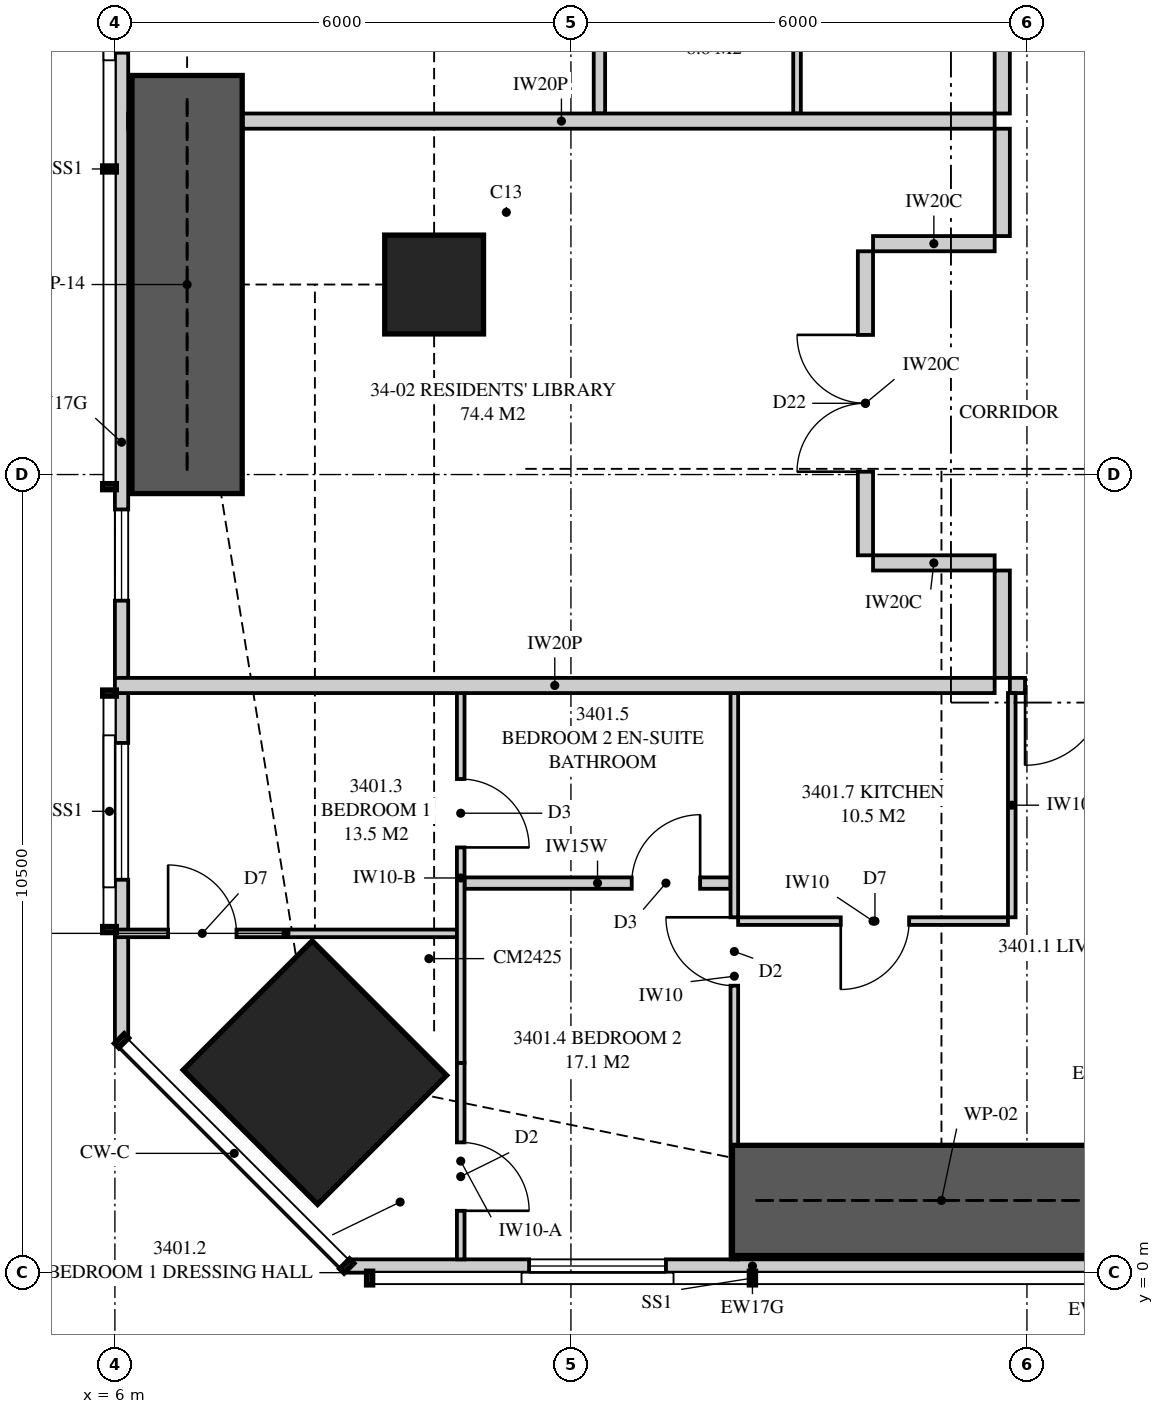
"""IFC4 building model, lengths in metres.
Left out: names, types, materials, properties, quantities, classifications, styles, units other than length and angle.
Written with IfcOpenShell. Run it as: python <this file> out.ifc"""

import sys

from ifc_helpers import new_model, si_unit, direction, frame, frame_2d, origin, origin_2d, place, context, subcontext, project, spatial, polyline, rectangle, outline, extrude, element, fill, save


model = new_model("IFC4")
c1 = context("Model", 3, precision=1e-05, world=origin(), true_north=direction((0.0, 1.0)))
c2 = subcontext(c1, "Body", "Model", "MODEL_VIEW")
j1 = project(units=[si_unit("LENGTHUNIT", "METRE"), si_unit("PLANEANGLEUNIT", "RADIAN")], contexts=[c1])
p1 = place(None, origin())
s1 = spatial("IfcSite", under=j1, at=p1, CompositionType="ELEMENT")
p2 = place(p1, origin())
s2 = spatial("IfcBuilding", under=s1, at=p2, CompositionType="ELEMENT")
p3 = place(p2, frame((0.0, 0.0, 124.95)))
s3 = spatial("IfcBuildingStorey", under=s2, at=p3, CompositionType="ELEMENT", Elevation=124.95)
p4 = place(p3, frame((8.631, 2.631, 0.0), z_axis=(0.0, 0.0, 1.0), x_axis=(0.707106781187, 0.707106781187, 0.0)))
e1 = element("IfcColumn", 1, at=p4, inside=s3, PredefinedType="COLUMN", context=c2, shape_type="SweptSolid", body=[
    extrude(rectangle(XDim=2.4, YDim=2.5, at=origin_2d()), origin(), (0.0, 0.0, 1.0), 3.35),
])
p5 = place(p3, frame((10.2, 13.0, 0.0), z_axis=(0.0, 0.0, 1.0), x_axis=(1.0, 0.0, 0.0)))
e2 = element("IfcColumn", 2, at=p5, inside=s3, PredefinedType="COLUMN", context=c2, shape_type="SweptSolid", body=[
    extrude(rectangle(XDim=1.3, YDim=1.3, at=origin_2d()), origin(), (0.0, 0.0, 1.0), 3.35),
])
p6 = place(p3, frame((9.051, 0.087, 0.0), z_axis=(0.0, 0.0, 1.0), x_axis=(1.0, 0.0, 0.0)))
e3 = element("IfcWall", 3, at=p6, inside=s3, PredefinedType="SOLIDWALL", context=c2, shape_type="SweptSolid", body=[
    extrude(outline(polyline([(0.0, 0.0), (10.674, 0.0), (10.674, 2.15), (7.824, 2.15), (7.824, 3.11), (7.666, 3.11), (7.666, 2.15), (7.62, 2.15), (7.62, 3.11), (0.0, 3.11), (0.0, 0.0)])), frame((0.0, 0.087, 0.0), z_axis=(0.0, -1.0, 0.0), x_axis=(1.0, 0.0, 0.0)), (0.0, 0.0, 1.0), 0.175),
])
p7 = place(p6, frame((2.399, 0.0, 0.4)))
e4 = element("IfcOpeningElement", 4, at=p7, cuts=e3, PredefinedType="OPENING", context=c2, shape_type="SweptSolid", body=[
    extrude(rectangle(XDim=1.8, YDim=1.7, at=frame_2d((0.9, 0.85))), frame((0.0, 0.097, 0.0), z_axis=(0.0, -1.0, 0.0), x_axis=(1.0, 0.0, 0.0)), (0.0, 0.0, 1.0), 0.195),
])
p8 = place(p3, frame((6.087, 18.8, 0.0), z_axis=(0.0, 0.0, 1.0), x_axis=(0.0, -1.0, 0.0)))
e5 = element("IfcWall", 5, at=p8, inside=s3, PredefinedType="SOLIDWALL", context=c2, shape_type="SweptSolid", body=[
    extrude(outline(polyline([(0.0, 0.0), (15.749, 0.0), (15.749, 3.11), (6.019, 3.11), (6.019, 2.15), (5.926, 2.15), (5.926, 3.11), (5.8, 3.11), (5.8, 2.15), (0.0, 2.15), (0.0, 0.0)])), frame((0.0, 0.087, 0.0), z_axis=(0.0, -1.0, 0.0), x_axis=(1.0, 0.0, 0.0)), (0.0, 0.0, 1.0), 0.175),
])
p9 = place(p8, frame((0.95, 0.0, 0.4)))
e6 = element("IfcOpeningElement", 6, at=p9, cuts=e5, PredefinedType="OPENING", context=c2, shape_type="SweptSolid", body=[
    extrude(rectangle(XDim=1.8, YDim=1.7, at=frame_2d((0.9, 0.85))), frame((0.0, 0.097, 0.0), z_axis=(0.0, -1.0, 0.0), x_axis=(1.0, 0.0, 0.0)), (0.0, 0.0, 1.0), 0.195),
])
p10 = place(p8, frame((8.76, 0.0, 0.4)))
e7 = element("IfcOpeningElement", 7, at=p10, cuts=e5, PredefinedType="OPENING", context=c2, shape_type="SweptSolid", body=[
    extrude(rectangle(XDim=1.2, YDim=1.7, at=frame_2d((0.6, 0.85))), frame((0.0, 0.097, 0.0), z_axis=(0.0, -1.0, 0.0), x_axis=(1.0, 0.0, 0.0)), (0.0, 0.0, 1.0), 0.195),
])
p11 = place(p8, frame((11.831, 0.0, 0.4)))
e8 = element("IfcOpeningElement", 8, at=p11, cuts=e5, PredefinedType="OPENING", context=c2, shape_type="SweptSolid", body=[
    extrude(rectangle(XDim=1.8, YDim=1.7, at=frame_2d((0.9, 0.85))), frame((0.0, 0.097, 0.0), z_axis=(0.0, -1.0, 0.0), x_axis=(1.0, 0.0, 0.0)), (0.0, 0.0, 1.0), 0.195),
])
p12 = place(p3, frame((17.775, 7.725, 0.0), z_axis=(0.0, 0.0, 1.0), x_axis=(1.0, 0.0, 0.0)))
e9 = element("IfcWall", 9, at=p12, inside=s3, PredefinedType="PARTITIONING", context=c2, shape_type="SweptSolid", body=[
    extrude(rectangle(XDim=9.025, YDim=0.2, at=frame_2d((4.513, 0.0))), origin(), (0.0, 0.0, 1.0), 3.11),
])
p13 = place(p12, frame((0.2, 0.0, 0.0)))
e10 = element("IfcOpeningElement", 10, at=p13, cuts=e9, PredefinedType="OPENING", context=c2, shape_type="SweptSolid", body=[
    extrude(rectangle(XDim=1.05, YDim=2.2, at=frame_2d((0.525, 1.1))), frame((0.0, 0.11, 0.0), z_axis=(0.0, -1.0, 0.0), x_axis=(1.0, 0.0, 0.0)), (0.0, 0.0, 1.0), 0.22),
])
p14 = place(p3, frame((10.55, 0.175, 0.0), z_axis=(0.0, 0.0, 1.0), x_axis=(0.0, 1.0, 0.0)))
e11 = element("IfcWall", 11, at=p14, inside=s3, PredefinedType="PARTITIONING", context=c2, shape_type="SweptSolid", body=[
    extrude(outline(polyline([(0.0, 0.0), (2.585, 0.0), (2.585, 2.15), (1.188, 2.15), (1.188, 3.11), (0.0, 3.11), (0.0, 0.0)])), frame((0.0, 0.05, 0.0), z_axis=(0.0, -1.0, 0.0), x_axis=(1.0, 0.0, 0.0)), (0.0, 0.0, 1.0), 0.1),
])
p15 = place(p14, frame((0.639, 0.0, 0.0)))
e12 = element("IfcOpeningElement", 12, at=p15, cuts=e11, PredefinedType="OPENING", context=c2, shape_type="SweptSolid", body=[
    extrude(rectangle(XDim=0.9, YDim=2.1, at=frame_2d((0.45, 1.05))), frame((0.0, 0.06, 0.0), z_axis=(0.0, -1.0, 0.0), x_axis=(1.0, 0.0, 0.0)), (0.0, 0.0, 1.0), 0.12),
])
p16 = place(p3, frame((10.55, 2.76, 0.0), z_axis=(0.0, 0.0, 1.0), x_axis=(0.0, 1.0, 0.0)))
e13 = element("IfcWall", 13, at=p16, inside=s3, PredefinedType="PARTITIONING", context=c2, shape_type="SweptSolid", body=[
    extrude(outline(polyline([(0.0, 0.0), (4.865, 0.0), (4.865, 2.51), (0.358, 2.51), (0.358, 2.15), (0.0, 2.15), (0.0, 0.0)])), frame((0.0, 0.05, 0.0), z_axis=(0.0, -1.0, 0.0), x_axis=(1.0, 0.0, 0.0)), (0.0, 0.0, 1.0), 0.1),
])
p17 = place(p16, frame((2.834, 0.0, 0.0)))
e14 = element("IfcOpeningElement", 14, at=p17, cuts=e13, PredefinedType="OPENING", context=c2, shape_type="SweptSolid", body=[
    extrude(rectangle(XDim=0.9, YDim=2.1, at=frame_2d((0.45, 1.05))), frame((0.0, 0.06, 0.0), z_axis=(0.0, -1.0, 0.0), x_axis=(1.0, 0.0, 0.0)), (0.0, 0.0, 1.0), 0.12),
])
p18 = place(p3, frame((14.15, 0.175, 0.0), z_axis=(0.0, 0.0, 1.0), x_axis=(0.0, 1.0, 0.0)))
e15 = element("IfcWall", 15, at=p18, inside=s3, PredefinedType="PARTITIONING", context=c2, shape_type="SweptSolid", body=[
    extrude(outline(polyline([(0.0, 0.0), (7.45, 0.0), (7.45, 3.11), (2.208, 3.11), (2.208, 2.15), (0.453, 2.15), (0.453, 3.11), (0.0, 3.11), (0.0, 0.0)])), frame((0.0, 0.05, 0.0), z_axis=(0.0, -1.0, 0.0), x_axis=(1.0, 0.0, 0.0)), (0.0, 0.0, 1.0), 0.1),
])
p19 = place(p18, frame((3.6, 0.0, 0.0)))
e16 = element("IfcOpeningElement", 16, at=p19, cuts=e15, PredefinedType="OPENING", context=c2, shape_type="SweptSolid", body=[
    extrude(rectangle(XDim=0.9, YDim=2.1, at=frame_2d((0.45, 1.05))), frame((0.0, 0.06, 0.0), z_axis=(0.0, -1.0, 0.0), x_axis=(1.0, 0.0, 0.0)), (0.0, 0.0, 1.0), 0.12),
])
p20 = place(p3, frame((6.0, 4.464, 0.0), z_axis=(0.0, 0.0, 1.0), x_axis=(1.0, 0.0, 0.0)))
e17 = element("IfcWall", 17, at=p20, inside=s3, PredefinedType="PARTITIONING", context=c2, shape_type="SweptSolid", body=[
    extrude(outline(polyline([(0.0, 0.0), (4.5, 0.0), (4.5, 3.11), (4.5, 2.51), (3.206, 2.51), (3.206, 2.15), (1.463, 2.15), (1.463, 3.11), (0.0, 3.11), (0.0, 0.0)])), frame((0.0, 0.05, 0.0), z_axis=(0.0, -1.0, 0.0), x_axis=(1.0, 0.0, 0.0)), (0.0, 0.0, 1.0), 0.1),
])
p21 = place(p20, frame((0.7, 0.0, 0.0)))
e18 = element("IfcOpeningElement", 18, at=p21, cuts=e17, PredefinedType="OPENING", context=c2, shape_type="SweptSolid", body=[
    extrude(rectangle(XDim=0.9, YDim=2.1, at=frame_2d((0.45, 1.05))), frame((0.0, 0.06, 0.0), z_axis=(0.0, -1.0, 0.0), x_axis=(1.0, 0.0, 0.0)), (0.0, 0.0, 1.0), 0.12),
])
p22 = place(p3, frame((10.6, 5.125, 0.0), z_axis=(0.0, 0.0, 1.0), x_axis=(1.0, 0.0, 0.0)))
e19 = element("IfcWall", 19, at=p22, inside=s3, PredefinedType="PLUMBINGWALL", context=c2, shape_type="SweptSolid", body=[
    extrude(outline(polyline([(0.0, 0.0), (3.5, 0.0), (3.5, 3.11), (0.885, 3.11), (0.885, 2.51), (0.0, 2.51), (0.0, 3.11), (0.0, 0.0)])), frame((0.0, 0.075, 0.0), z_axis=(0.0, -1.0, 0.0), x_axis=(1.0, 0.0, 0.0)), (0.0, 0.0, 1.0), 0.15),
])
p23 = place(p22, frame((2.2, 0.0, 0.0)))
e20 = element("IfcOpeningElement", 20, at=p23, cuts=e19, PredefinedType="OPENING", context=c2, shape_type="SweptSolid", body=[
    extrude(rectangle(XDim=0.9, YDim=2.1, at=frame_2d((0.45, 1.05))), frame((0.0, 0.085, 0.0), z_axis=(0.0, -1.0, 0.0), x_axis=(1.0, 0.0, 0.0)), (0.0, 0.0, 1.0), 0.17),
])
p24 = place(p3, frame((14.2, 4.625, 0.0), z_axis=(0.0, 0.0, 1.0), x_axis=(1.0, 0.0, 0.0)))
e21 = element("IfcWall", 21, at=p24, inside=s3, PredefinedType="PARTITIONING", context=c2, shape_type="SweptSolid", body=[
    extrude(outline(polyline([(0.0, 0.0), (3.55, 0.0), (3.55, 3.11), (2.962, 3.11), (2.962, 2.541), (2.388, 2.541), (2.388, 3.11), (0.0, 3.11), (0.0, 0.0)])), frame((0.0, 0.05, 0.0), z_axis=(0.0, -1.0, 0.0), x_axis=(1.0, 0.0, 0.0)), (0.0, 0.0, 1.0), 0.1),
])
p25 = place(p24, frame((1.35, 0.0, 0.0)))
e22 = element("IfcOpeningElement", 22, at=p25, cuts=e21, PredefinedType="OPENING", context=c2, shape_type="SweptSolid", body=[
    extrude(rectangle(XDim=0.9, YDim=2.1, at=frame_2d((0.45, 1.05))), frame((0.0, 0.06, 0.0), z_axis=(0.0, -1.0, 0.0), x_axis=(1.0, 0.0, 0.0)), (0.0, 0.0, 1.0), 0.12),
])
p26 = place(p3, frame((17.8, 4.675, 0.0), z_axis=(0.0, 0.0, 1.0), x_axis=(0.0, 1.0, 0.0)))
e23 = element("IfcWall", 23, at=p26, inside=s3, PredefinedType="PARTITIONING", context=c2, shape_type="SweptSolid", body=[
    extrude(rectangle(XDim=2.95, YDim=0.1, at=frame_2d((1.475, 0.0))), origin(), (0.0, 0.0, 1.0), 3.11),
])
p27 = place(p3, frame((6.0, 7.725, 0.0), z_axis=(0.0, 0.0, 1.0), x_axis=(1.0, 0.0, 0.0)))
e24 = element("IfcWall", 24, at=p27, inside=s3, PredefinedType="PARTITIONING", context=c2, shape_type="SweptSolid", body=[
    extrude(outline(polyline([(0.0, 0.0), (11.575, 0.0), (11.575, 3.11), (11.212, 3.11), (11.212, 2.541), (10.538, 2.541), (10.538, 3.11), (5.51, 3.11), (5.51, 2.51), (2.969, 2.51), (2.969, 2.541), (2.727, 2.541), (2.727, 2.15), (0.884, 2.15), (0.884, 3.11), (0.0, 3.11), (0.0, 0.0)])), frame((0.0, 0.1, 0.0), z_axis=(0.0, -1.0, 0.0), x_axis=(1.0, 0.0, 0.0)), (0.0, 0.0, 1.0), 0.2),
])
p28 = place(p3, frame((6.175, 15.15, 0.0), z_axis=(0.0, 0.0, 1.0), x_axis=(1.0, 0.0, 0.0)))
e25 = element("IfcWall", 25, at=p28, inside=s3, PredefinedType="PARTITIONING", context=c2, shape_type="SweptSolid", body=[
    extrude(outline(polyline([(0.529, 2.15), (0.0, 2.15), (0.0, 0.0), (0.529, 0.0), (0.529, 0.034), (1.021, 0.034), (1.021, 0.0), (11.4, 0.0), (11.4, 3.11), (5.335, 3.11), (5.335, 2.51), (2.715, 2.51), (2.715, 3.11), (1.685, 3.11), (1.685, 2.15), (1.021, 2.15), (1.021, 2.116), (0.529, 2.116), (0.529, 2.15)])), frame((0.0, 0.1, 0.0), z_axis=(0.0, -1.0, 0.0), x_axis=(1.0, 0.0, 0.0)), (0.0, 0.0, 1.0), 0.2),
])
p29 = place(p3, frame((17.675, 7.825, 0.0), z_axis=(0.0, 0.0, 1.0), x_axis=(0.0, 1.0, 0.0)))
e26 = element("IfcWall", 26, at=p29, inside=s3, PredefinedType="PARTITIONING", context=c2, shape_type="SweptSolid", body=[
    extrude(rectangle(XDim=1.413, YDim=0.2, at=frame_2d((0.706, 0.0))), origin(), (0.0, 0.0, 1.0), 3.11),
])
p30 = place(p3, frame((17.675, 15.25, 0.0), z_axis=(0.0, 0.0, 1.0), x_axis=(0.0, 1.0, 0.0)))
e27 = element("IfcWall", 27, at=p30, inside=s3, PredefinedType="PARTITIONING", context=c2, shape_type="SweptSolid", body=[
    extrude(rectangle(XDim=5.562, YDim=0.2, at=frame_2d((2.781, 0.0))), origin(), (0.0, 0.0, 1.0), 3.11),
])
p31 = place(p3, frame((12.375, 15.25, 0.0), z_axis=(0.0, 0.0, 1.0), x_axis=(0.0, 1.0, 0.0)))
e28 = element("IfcWall", 28, at=p31, inside=s3, PredefinedType="PLUMBINGWALL", context=c2, shape_type="SweptSolid", body=[
    extrude(rectangle(XDim=3.45, YDim=0.15, at=frame_2d((1.725, 0.0))), origin(), (0.0, 0.0, 1.0), 3.11),
])
p32 = place(p31, frame((2.15, 0.0, 0.0)))
e29 = element("IfcOpeningElement", 29, at=p32, cuts=e28, PredefinedType="OPENING", context=c2, shape_type="SweptSolid", body=[
    extrude(rectangle(XDim=0.9, YDim=2.1, at=frame_2d((0.45, 1.05))), frame((0.0, 0.085, 0.0), z_axis=(0.0, -1.0, 0.0), x_axis=(1.0, 0.0, 0.0)), (0.0, 0.0, 1.0), 0.17),
])
p33 = place(p3, frame((14.975, 15.25, 0.0), z_axis=(0.0, 0.0, 1.0), x_axis=(0.0, 1.0, 0.0)))
e30 = element("IfcWall", 30, at=p33, inside=s3, PredefinedType="PARTITIONING", context=c2, shape_type="SweptSolid", body=[
    extrude(rectangle(XDim=3.45, YDim=0.1, at=frame_2d((1.725, 0.0))), origin(), (0.0, 0.0, 1.0), 3.11),
])
p34 = place(p3, frame((17.675, 13.637, 0.0), z_axis=(0.0, 0.0, 1.0), x_axis=(0.0, 1.0, 0.0)))
e31 = element("IfcWall", 31, at=p34, inside=s3, PredefinedType="PARTITIONING", context=c2, shape_type="SweptSolid", body=[
    extrude(rectangle(XDim=1.413, YDim=0.2, at=frame_2d((0.706, 0.0))), origin(), (0.0, 0.0, 1.0), 3.11),
])
p35 = place(p3, frame((15.875, 9.438, 0.0), z_axis=(0.0, 0.0, 1.0), x_axis=(0.0, 1.0, 0.0)))
e32 = element("IfcWall", 32, at=p35, inside=s3, PredefinedType="PARTITIONING", context=c2, shape_type="SweptSolid", body=[
    extrude(outline(polyline([(0.0, 0.0), (4.0, 0.0), (4.0, 3.11), (1.475, 3.11), (1.475, 2.541), (0.8, 2.541), (0.8, 3.11), (0.0, 3.11), (0.0, 0.0)])), frame((0.0, 0.1, 0.0), z_axis=(0.0, -1.0, 0.0), x_axis=(1.0, 0.0, 0.0)), (0.0, 0.0, 1.0), 0.2),
])
p36 = place(p35, frame((1.1, 0.0, 0.0)))
e33 = element("IfcOpeningElement", 33, at=p36, cuts=e32, PredefinedType="OPENING", context=c2, shape_type="SweptSolid", body=[
    extrude(rectangle(XDim=1.8, YDim=2.1, at=frame_2d((0.9, 1.05))), frame((0.0, 0.11, 0.0), z_axis=(0.0, -1.0, 0.0), x_axis=(1.0, 0.0, 0.0)), (0.0, 0.0, 1.0), 0.22),
])
p37 = place(p3, frame((17.575, 9.337, 0.0), z_axis=(0.0, 0.0, 1.0), x_axis=(-1.0, 0.0, 0.0)))
e34 = element("IfcWall", 34, at=p37, inside=s3, PredefinedType="PARTITIONING", context=c2, shape_type="SweptSolid", body=[
    extrude(outline(polyline([(0.0, 0.0), (1.6, 0.0), (1.6, 3.11), (1.037, 3.11), (1.037, 2.541), (0.363, 2.541), (0.363, 3.11), (0.0, 3.11), (0.0, 0.0)])), frame((0.0, 0.1, 0.0), z_axis=(0.0, -1.0, 0.0), x_axis=(1.0, 0.0, 0.0)), (0.0, 0.0, 1.0), 0.2),
])
p38 = place(p3, frame((17.575, 13.538, 0.0), z_axis=(0.0, 0.0, 1.0), x_axis=(-1.0, 0.0, 0.0)))
e35 = element("IfcWall", 35, at=p38, inside=s3, PredefinedType="PARTITIONING", context=c2, shape_type="SweptSolid", body=[
    extrude(rectangle(XDim=1.6, YDim=0.2, at=frame_2d((0.8, 0.0))), origin(), (0.0, 0.0, 1.0), 3.11),
])
for number, where, z_axis, x_axis in (
    (36, (14.125, 0.95, 0.0), (0.0, 0.0, 1.0), (1.0, 0.0, 0.0)),
    (37, (6.95, 10.25, 0.0), (0.0, 0.0, 1.0), (0.0, 1.0, 0.0)),
):
    element("IfcWall", number, at=place(p3, frame(where, z_axis=z_axis, x_axis=x_axis)), inside=s3, PredefinedType="SHEAR", context=c2, shape_type="SweptSolid", body=[
        extrude(rectangle(XDim=5.5, YDim=1.45, at=frame_2d((2.75, 0.0))), origin(), (0.0, 0.0, 1.0), 3.35),
    ])
p39 = place(p7, origin())
e38 = element("IfcWindow", 38, at=p39, inside=s3, PartitioningType="SINGLE_PANEL", PredefinedType="WINDOW", context=c2, shape_type="SweptSolid", body=[
    extrude(rectangle(XDim=1.8, YDim=1.7, at=frame_2d((0.9, 0.85))), frame((0.0, 0.03, 0.0), z_axis=(0.0, -1.0, 0.0), x_axis=(1.0, 0.0, 0.0)), (0.0, 0.0, 1.0), 0.06),
])
fill(e4, e38)
p40 = place(p10, origin())
e39 = element("IfcWindow", 39, at=p40, inside=s3, PartitioningType="SINGLE_PANEL", PredefinedType="WINDOW", context=c2, shape_type="SweptSolid", body=[
    extrude(rectangle(XDim=1.2, YDim=1.7, at=frame_2d((0.6, 0.85))), frame((0.0, 0.03, 0.0), z_axis=(0.0, -1.0, 0.0), x_axis=(1.0, 0.0, 0.0)), (0.0, 0.0, 1.0), 0.06),
])
fill(e7, e39)
p41 = place(p11, origin())
e40 = element("IfcWindow", 40, at=p41, inside=s3, PartitioningType="SINGLE_PANEL", PredefinedType="WINDOW", context=c2, shape_type="SweptSolid", body=[
    extrude(rectangle(XDim=1.8, YDim=1.7, at=frame_2d((0.9, 0.85))), frame((0.0, 0.03, 0.0), z_axis=(0.0, -1.0, 0.0), x_axis=(1.0, 0.0, 0.0)), (0.0, 0.0, 1.0), 0.06),
])
fill(e8, e40)
p42 = place(p13, frame((1.05, 0.0, 0.0), z_axis=(0.0, 0.0, 1.0), x_axis=(-1.0, 0.0, 0.0)))
e41 = element("IfcDoor", 41, at=p42, inside=s3, OperationType="SINGLE_SWING_RIGHT", PredefinedType="DOOR", context=c2, shape_type="SweptSolid", body=[
    extrude(rectangle(XDim=1.05, YDim=2.2, at=frame_2d((0.525, 1.1))), frame((0.0, 0.025, 0.0), z_axis=(0.0, -1.0, 0.0), x_axis=(1.0, 0.0, 0.0)), (0.0, 0.0, 1.0), 0.05),
])
fill(e10, e41)
p43 = place(p21, origin())
e42 = element("IfcDoor", 42, at=p43, inside=s3, OperationType="SINGLE_SWING_LEFT", PredefinedType="DOOR", context=c2, shape_type="SweptSolid", body=[
    extrude(rectangle(XDim=0.9, YDim=2.1, at=frame_2d((0.45, 1.05))), frame((0.0, 0.025, 0.0), z_axis=(0.0, -1.0, 0.0), x_axis=(1.0, 0.0, 0.0)), (0.0, 0.0, 1.0), 0.05),
])
fill(e18, e42)
p44 = place(p15, frame((0.9, 0.0, 0.0), z_axis=(0.0, 0.0, 1.0), x_axis=(-1.0, 0.0, 0.0)))
e43 = element("IfcDoor", 43, at=p44, inside=s3, OperationType="SINGLE_SWING_RIGHT", PredefinedType="DOOR", context=c2, shape_type="SweptSolid", body=[
    extrude(rectangle(XDim=0.9, YDim=2.1, at=frame_2d((0.45, 1.05))), frame((0.0, 0.025, 0.0), z_axis=(0.0, -1.0, 0.0), x_axis=(1.0, 0.0, 0.0)), (0.0, 0.0, 1.0), 0.05),
])
fill(e12, e43)
p45 = place(p19, origin())
e44 = element("IfcDoor", 44, at=p45, inside=s3, OperationType="SINGLE_SWING_RIGHT", PredefinedType="DOOR", context=c2, shape_type="SweptSolid", body=[
    extrude(rectangle(XDim=0.9, YDim=2.1, at=frame_2d((0.45, 1.05))), frame((0.0, 0.025, 0.0), z_axis=(0.0, -1.0, 0.0), x_axis=(1.0, 0.0, 0.0)), (0.0, 0.0, 1.0), 0.05),
])
fill(e16, e44)
p46 = place(p23, origin())
e45 = element("IfcDoor", 45, at=p46, inside=s3, OperationType="SINGLE_SWING_RIGHT", PredefinedType="DOOR", context=c2, shape_type="SweptSolid", body=[
    extrude(rectangle(XDim=0.9, YDim=2.1, at=frame_2d((0.45, 1.05))), frame((0.0, 0.025, 0.0), z_axis=(0.0, -1.0, 0.0), x_axis=(1.0, 0.0, 0.0)), (0.0, 0.0, 1.0), 0.05),
])
fill(e20, e45)
p47 = place(p17, frame((0.9, 0.0, 0.0), z_axis=(0.0, 0.0, 1.0), x_axis=(-1.0, 0.0, 0.0)))
e46 = element("IfcDoor", 46, at=p47, inside=s3, OperationType="SINGLE_SWING_RIGHT", PredefinedType="DOOR", context=c2, shape_type="SweptSolid", body=[
    extrude(rectangle(XDim=0.9, YDim=2.1, at=frame_2d((0.45, 1.05))), frame((0.0, 0.025, 0.0), z_axis=(0.0, -1.0, 0.0), x_axis=(1.0, 0.0, 0.0)), (0.0, 0.0, 1.0), 0.05),
])
fill(e14, e46)
p48 = place(p25, frame((0.9, 0.0, 0.0), z_axis=(0.0, 0.0, 1.0), x_axis=(-1.0, 0.0, 0.0)))
e47 = element("IfcDoor", 47, at=p48, inside=s3, OperationType="SINGLE_SWING_RIGHT", PredefinedType="DOOR", context=c2, shape_type="SweptSolid", body=[
    extrude(rectangle(XDim=0.9, YDim=2.1, at=frame_2d((0.45, 1.05))), frame((0.0, 0.025, 0.0), z_axis=(0.0, -1.0, 0.0), x_axis=(1.0, 0.0, 0.0)), (0.0, 0.0, 1.0), 0.05),
])
fill(e22, e47)
p49 = place(p36, origin())
e48 = element("IfcDoor", 48, at=p49, inside=s3, OperationType="DOUBLE_DOOR_SINGLE_SWING", PredefinedType="DOOR", context=c2, shape_type="SweptSolid", body=[
    extrude(rectangle(XDim=1.8, YDim=2.1, at=frame_2d((0.9, 1.05))), frame((0.0, 0.025, 0.0), z_axis=(0.0, -1.0, 0.0), x_axis=(1.0, 0.0, 0.0)), (0.0, 0.0, 1.0), 0.05),
])
fill(e33, e48)
save(model, sys.argv[1])
